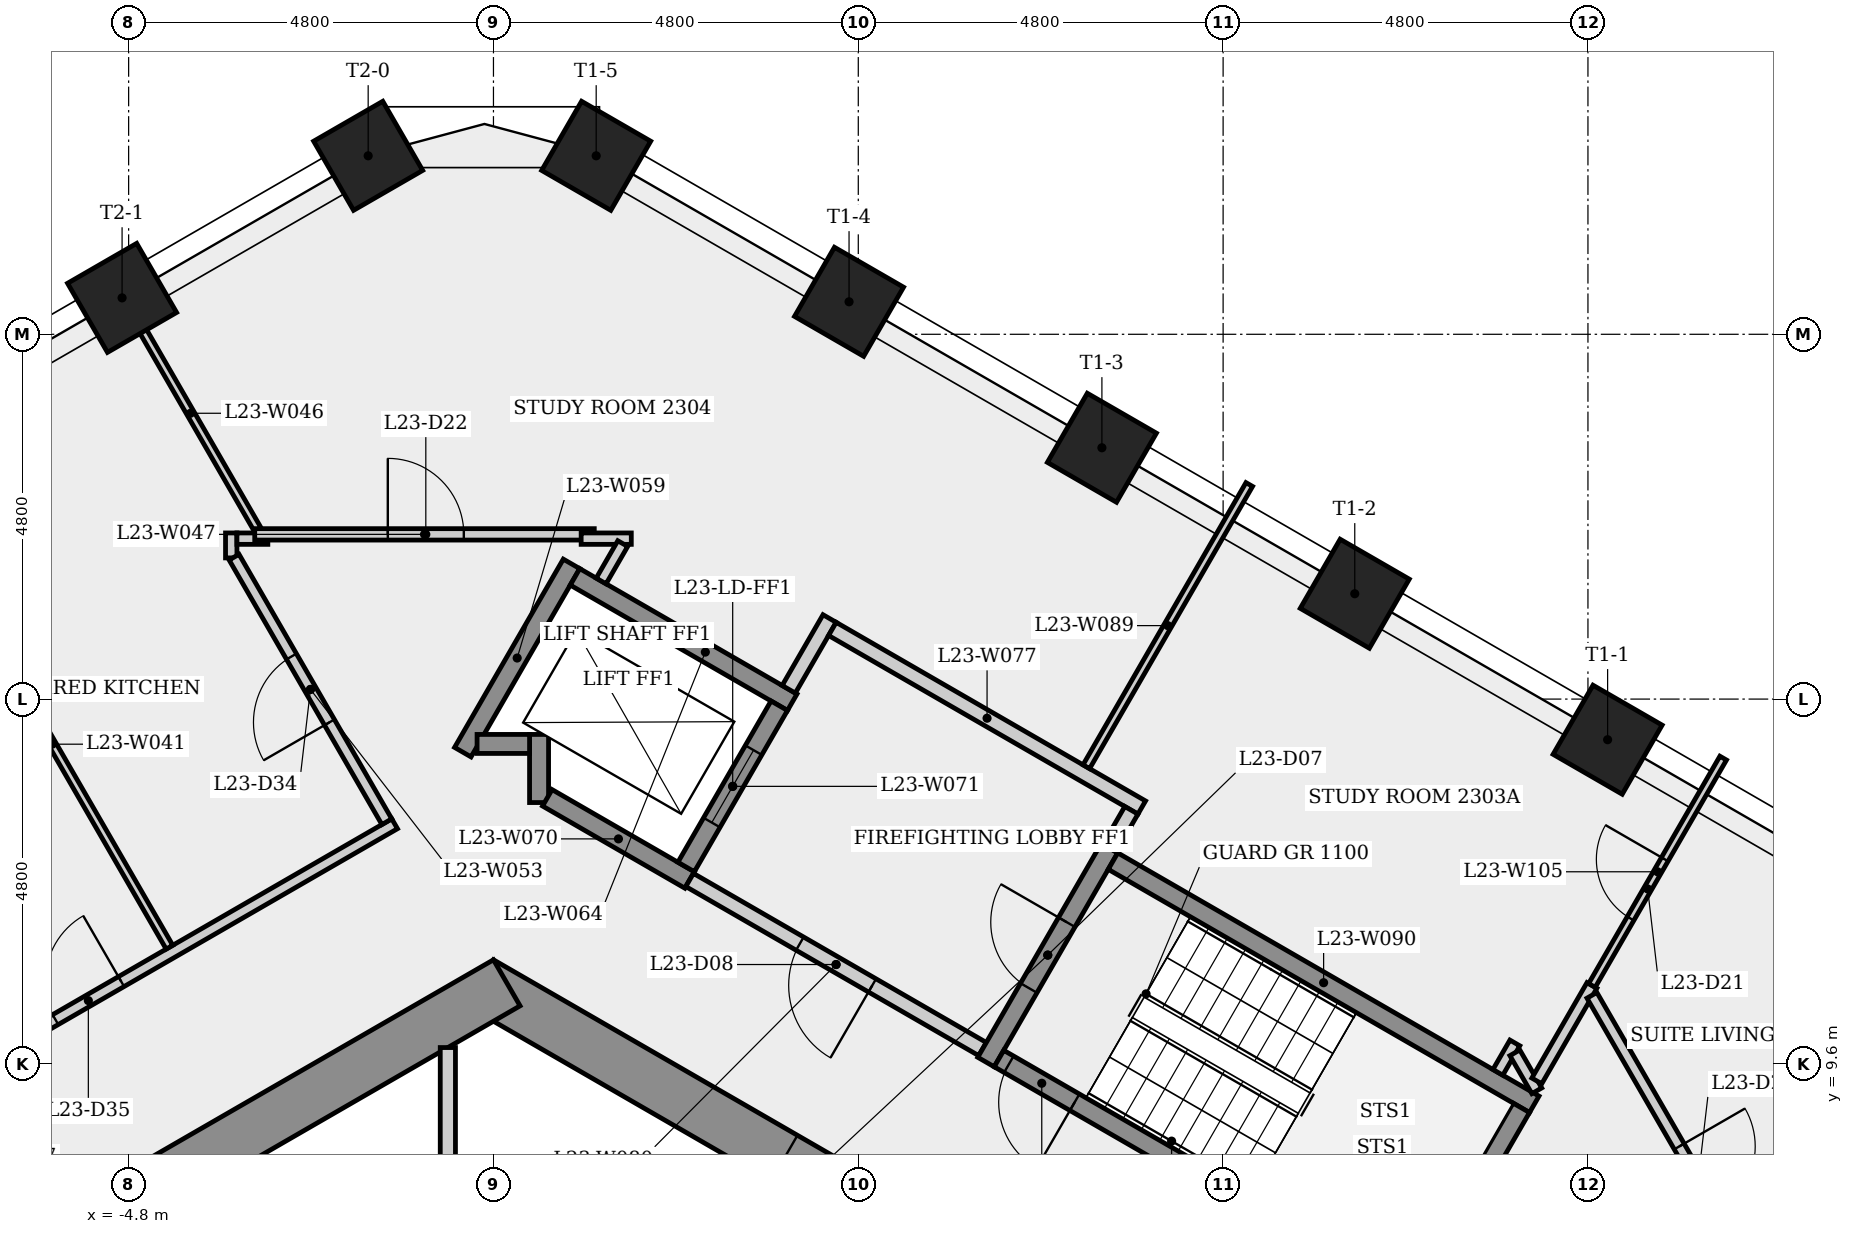
"""IFC4 building model, lengths in metres.
Left out: names, types, materials, properties, quantities, classifications, styles, units other than length and angle.
Written with IfcOpenShell. Run it as: python <this file> out.ifc"""

import sys

from ifc_helpers import new_model, si_unit, direction, frame, frame_2d, origin, origin_2d, place, context, subcontext, project, spatial, rectangle, extrude, element, fill, save


model = new_model("IFC4")
c1 = context("Model", 3, precision=1e-05, world=origin(), true_north=direction((0.0, 1.0)))
c2 = subcontext(c1, "Body", "Model", "MODEL_VIEW")
j1 = project(units=[si_unit("LENGTHUNIT", "METRE"), si_unit("PLANEANGLEUNIT", "RADIAN")], contexts=[c1])
p1 = place(None, origin())
s1 = spatial("IfcSite", under=j1, at=p1, CompositionType="ELEMENT")
p2 = place(p1, origin())
s2 = spatial("IfcBuilding", under=s1, at=p2, CompositionType="ELEMENT")
p3 = place(p2, frame((0.0, 0.0, 89.9)))
s3 = spatial("IfcBuildingStorey", under=s2, at=p3, CompositionType="ELEMENT", Elevation=89.9)
p4 = place(p3, frame((9.325, 5.182, 0.0), z_axis=(0.0, 0.0, 1.0), x_axis=(-0.866023993627, 0.500002442456, 0.0)))
e1 = element("IfcWall", 1, at=p4, inside=s3, PredefinedType="SHEAR", context=c2, shape_type="SweptSolid", body=[
    extrude(rectangle(XDim=10.97, YDim=0.7, at=frame_2d((5.485, 0.0))), origin(), (0.0, 0.0, 1.0), 3.4),
])
p5 = place(p4, frame((5.451, 0.0, 0.0)))
e2 = element("IfcOpeningElement", 2, at=p5, cuts=e1, PredefinedType="OPENING", context=c2, shape_type="SweptSolid", body=[
    extrude(rectangle(XDim=0.9, YDim=2.1, at=frame_2d((0.45, 1.05))), frame((0.0, 0.36, 0.0), z_axis=(0.0, -1.0, 0.0), x_axis=(1.0, 0.0, 0.0)), (0.0, 0.0, 1.0), 0.72),
])
p6 = place(p3, frame((0.175, 10.667, 0.0), z_axis=(0.0, 0.0, 1.0), x_axis=(-0.866023993627, -0.500002442456, 0.0)))
e3 = element("IfcWall", 3, at=p6, inside=s3, PredefinedType="SHEAR", context=c2, shape_type="SweptSolid", body=[
    extrude(rectangle(XDim=10.97, YDim=0.7, at=frame_2d((5.485, 0.0))), origin(), (0.0, 0.0, 1.0), 3.4),
])
p7 = place(p6, frame((7.021, 0.0, 0.0)))
e4 = element("IfcOpeningElement", 4, at=p7, cuts=e3, PredefinedType="OPENING", context=c2, shape_type="SweptSolid", body=[
    extrude(rectangle(XDim=0.9, YDim=2.1, at=frame_2d((0.45, 1.05))), frame((0.0, 0.36, 0.0), z_axis=(0.0, -1.0, 0.0), x_axis=(1.0, 0.0, 0.0)), (0.0, 0.0, 1.0), 0.72),
])
for number, where, z_axis, x_axis in (
    (5, (14.659, 13.865, 0.0), (0.0, 0.0, 1.0), (0.5, 0.866, 0.0)),
    (6, (11.332, 15.786, 0.0), (0.0, 0.0, 1.0), (0.5, 0.866, 0.0)),
    (7, (8.005, 17.707, 0.0), (0.0, 0.0, 1.0), (0.5, 0.866, 0.0)),
    (8, (4.678, 19.628, 0.0), (0.0, 0.0, 1.0), (0.5, 0.866, 0.0)),
    (9, (1.352, 21.548, 0.0), (0.0, 0.0, 1.0), (0.5, 0.866, 0.0)),
    (10, (-1.648, 21.548, 0.0), (0.0, 0.0, 1.0), (-0.5, 0.866, 0.0)),
    (11, (-4.886, 19.679, 0.0), (0.0, 0.0, 1.0), (-0.5, 0.866, 0.0)),
):
    element("IfcColumn", number, at=place(p3, frame(where, z_axis=z_axis, x_axis=x_axis)), inside=s3, PredefinedType="COLUMN", context=c2, shape_type="SweptSolid", body=[
        extrude(rectangle(XDim=1.05, YDim=1.05, at=origin_2d()), origin(), (0.0, 0.0, 1.0), 3.4),
    ])
p8 = place(p3, frame((-10.659, 7.356, 0.0), z_axis=(0.0, 0.0, 1.0), x_axis=(0.866022689903, 0.500004700551, 0.0)))
e12 = element("IfcWall", 12, at=p8, inside=s3, PredefinedType="PARTITIONING", context=c2, shape_type="SweptSolid", body=[
    extrude(rectangle(XDim=10.807, YDim=0.15, at=frame_2d((5.404, 0.0))), origin(), (0.0, 0.0, 1.0), 3.05),
])
p9 = place(p8, frame((5.654, 0.0, 0.0)))
e13 = element("IfcOpeningElement", 13, at=p9, cuts=e12, PredefinedType="OPENING", context=c2, shape_type="SweptSolid", body=[
    extrude(rectangle(XDim=1.0, YDim=2.1, at=frame_2d((0.5, 1.05))), frame((0.0, 0.085, 0.0), z_axis=(0.0, -1.0, 0.0), x_axis=(1.0, 0.0, 0.0)), (0.0, 0.0, 1.0), 0.17),
])
p10 = place(p3, frame((-4.263, 11.135, 0.0), z_axis=(0.0, 0.0, 1.0), x_axis=(-0.499997453958, 0.866026873738, 0.0)))
e14 = element("IfcWall", 14, at=p10, inside=s3, PredefinedType="PARTITIONING", context=c2, shape_type="SweptSolid", body=[
    extrude(rectangle(XDim=7.71, YDim=0.1, at=frame_2d((3.855, 0.0))), origin(), (0.0, 0.0, 1.0), 3.05),
])
p11 = place(p3, frame((-3.45, 16.258, 0.0), z_axis=(0.0, 0.0, 1.0), x_axis=(0.0, 1.0, 0.0)))
e15 = element("IfcWall", 15, at=p11, inside=s3, PredefinedType="PARTITIONING", context=c2, shape_type="SweptSolid", body=[
    extrude(rectangle(XDim=0.328, YDim=0.15, at=frame_2d((0.164, 0.0))), origin(), (0.0, 0.0, 1.0), 3.05),
])
p12 = place(p3, frame((-3.375, 16.511, 0.0), z_axis=(0.0, 0.0, 1.0), x_axis=(1.0, 0.0, 0.0)))
e16 = element("IfcWall", 16, at=p12, inside=s3, PredefinedType="PARTITIONING", context=c2, shape_type="SweptSolid", body=[
    extrude(rectangle(XDim=0.406, YDim=0.15, at=frame_2d((0.203, 0.0))), origin(), (0.0, 0.0, 1.0), 3.05),
])
p13 = place(p3, frame((-3.104, 16.632, 0.0), z_axis=(0.0, 0.0, 1.0), x_axis=(-0.499999858875, 0.866025485263, 0.0)))
e17 = element("IfcWall", 17, at=p13, inside=s3, PredefinedType="PARTITIONING", context=c2, shape_type="SweptSolid", body=[
    extrude(rectangle(XDim=3.53, YDim=0.1, at=frame_2d((1.765, 0.0))), origin(), (0.0, 0.0, 1.0), 3.05),
])
p14 = place(p3, frame((-3.141, 16.567, 0.0), z_axis=(0.0, 0.0, 1.0), x_axis=(1.0, 0.0, 0.0)))
e18 = element("IfcWall", 18, at=p14, inside=s3, PredefinedType="PARTITIONING", context=c2, shape_type="SweptSolid", body=[
    extrude(rectangle(XDim=4.467, YDim=0.15, at=frame_2d((2.234, 0.0))), origin(), (0.0, 0.0, 1.0), 3.05),
])
p15 = place(p14, frame((1.751, 0.0, 0.0)))
e19 = element("IfcOpeningElement", 19, at=p15, cuts=e18, PredefinedType="OPENING", context=c2, shape_type="SweptSolid", body=[
    extrude(rectangle(XDim=1.0, YDim=2.1, at=frame_2d((0.5, 1.05))), frame((0.0, 0.085, 0.0), z_axis=(0.0, -1.0, 0.0), x_axis=(1.0, 0.0, 0.0)), (0.0, 0.0, 1.0), 0.17),
])
p16 = place(p3, frame((-1.403, 12.787, 0.0), z_axis=(0.0, 0.0, 1.0), x_axis=(-0.500006371327, 0.866021725266, 0.0)))
e20 = element("IfcWall", 20, at=p16, inside=s3, PredefinedType="PARTITIONING", context=c2, shape_type="SweptSolid", body=[
    extrude(rectangle(XDim=4.02, YDim=0.15, at=frame_2d((2.01, 0.0))), origin(), (0.0, 0.0, 1.0), 3.05),
])
p17 = place(p16, frame((1.51, 0.0, 0.0)))
e21 = element("IfcOpeningElement", 21, at=p17, cuts=e20, PredefinedType="OPENING", context=c2, shape_type="SweptSolid", body=[
    extrude(rectangle(XDim=1.0, YDim=2.1, at=frame_2d((0.5, 1.05))), frame((0.0, 0.085, 0.0), z_axis=(0.0, -1.0, 0.0), x_axis=(1.0, 0.0, 0.0)), (0.0, 0.0, 1.0), 0.17),
])
p18 = place(p3, frame((-0.6, 9.815, 0.0), z_axis=(0.0, 0.0, 1.0), x_axis=(0.0, -1.0, 0.0)))
e22 = element("IfcWall", 22, at=p18, inside=s3, PredefinedType="PARTITIONING", context=c2, shape_type="SweptSolid", body=[
    extrude(rectangle(XDim=4.54, YDim=0.2, at=frame_2d((2.27, 0.0))), origin(), (0.0, 0.0, 1.0), 3.05),
])
p19 = place(p3, frame((-0.403, 13.702, 0.0), z_axis=(0.0, 0.0, 1.0), x_axis=(0.499976111731, 0.866039195244, 0.0)))
e23 = element("IfcWall", 23, at=p19, inside=s3, PredefinedType="SHEAR", context=c2, shape_type="SweptSolid", body=[
    extrude(rectangle(XDim=2.861, YDim=0.25, at=frame_2d((1.43, 0.0))), origin(), (0.0, 0.0, 1.0), 3.05),
])
p20 = place(p3, frame((0.6, 13.039, 0.0), z_axis=(0.0, 0.0, 1.0), x_axis=(0.0, 1.0, 0.0)))
e24 = element("IfcWall", 24, at=p20, inside=s3, PredefinedType="SHEAR", context=c2, shape_type="SweptSolid", body=[
    extrude(rectangle(XDim=0.896, YDim=0.25, at=frame_2d((0.448, 0.0))), origin(), (0.0, 0.0, 1.0), 3.05),
])
p21 = place(p3, frame((0.475, 13.81, 0.0), z_axis=(0.0, 0.0, 1.0), x_axis=(-1.0, 0.0, 0.0)))
e25 = element("IfcWall", 25, at=p21, inside=s3, PredefinedType="SHEAR", context=c2, shape_type="SweptSolid", body=[
    extrude(rectangle(XDim=0.691, YDim=0.25, at=frame_2d((0.345, 0.0))), origin(), (0.0, 0.0, 1.0), 3.4),
])
p22 = place(p3, frame((1.073, 16.008, 0.0), z_axis=(0.0, 0.0, 1.0), x_axis=(0.866040211805, -0.499974350878, 0.0)))
e26 = element("IfcWall", 26, at=p22, inside=s3, PredefinedType="SHEAR", context=c2, shape_type="SweptSolid", body=[
    extrude(rectangle(XDim=3.3, YDim=0.25, at=frame_2d((1.65, 0.0))), origin(), (0.0, 0.0, 1.0), 3.05),
])
p23 = place(p3, frame((1.154, 16.511, 0.0), z_axis=(0.0, 0.0, 1.0), x_axis=(1.0, 0.0, 0.0)))
e27 = element("IfcWall", 27, at=p23, inside=s3, PredefinedType="PARTITIONING", context=c2, shape_type="SweptSolid", body=[
    extrude(rectangle(XDim=0.66, YDim=0.15, at=frame_2d((0.33, 0.0))), origin(), (0.0, 0.0, 1.0), 3.05),
])
p24 = place(p3, frame((1.701, 16.446, 0.0), z_axis=(0.0, 0.0, 1.0), x_axis=(-0.500206000974, -0.865906436394, 0.0)))
e28 = element("IfcWall", 28, at=p24, inside=s3, PredefinedType="PARTITIONING", context=c2, shape_type="SweptSolid", body=[
    extrude(rectangle(XDim=0.568, YDim=0.15, at=frame_2d((0.284, 0.0))), origin(), (0.0, 0.0, 1.0), 3.05),
])
p25 = place(p3, frame((2.581, 12.02, 0.0), z_axis=(0.0, 0.0, 1.0), x_axis=(-0.86603892542, 0.499976579108, 0.0)))
e29 = element("IfcWall", 29, at=p25, inside=s3, PredefinedType="SHEAR", context=c2, shape_type="SweptSolid", body=[
    extrude(rectangle(XDim=2.162, YDim=0.25, at=frame_2d((1.081, 0.0))), origin(), (0.0, 0.0, 1.0), 3.05),
])
p26 = place(p3, frame((2.535, 12.191, 0.0), z_axis=(0.0, 0.0, 1.0), x_axis=(0.500061746146, 0.865989751695, 0.0)))
e30 = element("IfcWall", 30, at=p26, inside=s3, PredefinedType="SHEAR", context=c2, shape_type="SweptSolid", body=[
    extrude(rectangle(XDim=2.45, YDim=0.25, at=frame_2d((1.225, 0.0))), origin(), (0.0, 0.0, 1.0), 3.4),
])
p27 = place(p26, frame((0.675, 0.0, 0.0)))
e31 = element("IfcOpeningElement", 31, at=p27, cuts=e30, PredefinedType="OPENING", context=c2, shape_type="SweptSolid", body=[
    extrude(rectangle(XDim=1.1, YDim=2.1, at=frame_2d((0.55, 1.05))), frame((0.0, 0.135, 0.0), z_axis=(0.0, -1.0, 0.0), x_axis=(1.0, 0.0, 0.0)), (0.0, 0.0, 1.0), 0.27),
])
p28 = place(p3, frame((3.885, 14.529, 0.0), z_axis=(0.0, 0.0, 1.0), x_axis=(0.499997628298, 0.866026773083, 0.0)))
e32 = element("IfcWall", 32, at=p28, inside=s3, PredefinedType="PARTITIONING", context=c2, shape_type="SweptSolid", body=[
    extrude(rectangle(XDim=1.075, YDim=0.2, at=frame_2d((0.538, 0.0))), origin(), (0.0, 0.0, 1.0), 3.05),
])
p29 = place(p3, frame((4.459, 15.323, 0.0), z_axis=(0.0, 0.0, 1.0), x_axis=(0.866016039709, -0.500016218704, 0.0)))
e33 = element("IfcWall", 33, at=p29, inside=s3, PredefinedType="PARTITIONING", context=c2, shape_type="SweptSolid", body=[
    extrude(rectangle(XDim=4.7, YDim=0.2, at=frame_2d((2.35, 0.0))), origin(), (0.0, 0.0, 1.0), 3.05),
])
p30 = place(p3, frame((6.435, 9.795, 0.0), z_axis=(0.0, 0.0, 1.0), x_axis=(-0.866012907634, 0.500021643343, 0.0)))
e34 = element("IfcWall", 34, at=p30, inside=s3, PredefinedType="PARTITIONING", context=c2, shape_type="SweptSolid", body=[
    extrude(rectangle(XDim=4.45, YDim=0.2, at=frame_2d((2.225, 0.0))), origin(), (0.0, 0.0, 1.0), 3.05),
])
p31 = place(p30, frame((1.675, 0.0, 0.0)))
e35 = element("IfcOpeningElement", 35, at=p31, cuts=e34, PredefinedType="OPENING", context=c2, shape_type="SweptSolid", body=[
    extrude(rectangle(XDim=1.1, YDim=2.1, at=frame_2d((0.55, 1.05))), frame((0.0, 0.11, 0.0), z_axis=(0.0, -1.0, 0.0), x_axis=(1.0, 0.0, 0.0)), (0.0, 0.0, 1.0), 0.22),
])
p32 = place(p3, frame((6.48, 9.624, 0.0), z_axis=(0.0, 0.0, 1.0), x_axis=(0.500017246033, 0.866015446554, 0.0)))
e36 = element("IfcWall", 36, at=p32, inside=s3, PredefinedType="SHEAR", context=c2, shape_type="SweptSolid", body=[
    extrude(rectangle(XDim=3.25, YDim=0.25, at=frame_2d((1.625, 0.0))), origin(), (0.0, 0.0, 1.0), 3.05),
])
p33 = place(p32, frame((1.125, 0.0, 0.0)))
e37 = element("IfcOpeningElement", 37, at=p33, cuts=e36, PredefinedType="OPENING", context=c2, shape_type="SweptSolid", body=[
    extrude(rectangle(XDim=1.0, YDim=2.1, at=frame_2d((0.5, 1.05))), frame((0.0, 0.135, 0.0), z_axis=(0.0, -1.0, 0.0), x_axis=(1.0, 0.0, 0.0)), (0.0, 0.0, 1.0), 0.27),
])
p34 = place(p3, frame((7.8, 13.51, 0.0), z_axis=(0.0, 0.0, 1.0), x_axis=(0.499978750566, 0.866037671803, 0.0)))
e38 = element("IfcWall", 38, at=p34, inside=s3, PredefinedType="PARTITIONING", context=c2, shape_type="SweptSolid", body=[
    extrude(rectangle(XDim=4.288, YDim=0.1, at=frame_2d((2.144, 0.0))), origin(), (0.0, 0.0, 1.0), 3.05),
])
p35 = place(p3, frame((8.151, 12.268, 0.0), z_axis=(0.0, 0.0, 1.0), x_axis=(0.866025499775, -0.499999833739, 0.0)))
e39 = element("IfcWall", 39, at=p35, inside=s3, PredefinedType="SHEAR", context=c2, shape_type="SweptSolid", body=[
    extrude(rectangle(XDim=6.4, YDim=0.25, at=frame_2d((3.2, 0.0))), origin(), (0.0, 0.0, 1.0), 3.05),
])
p36 = place(p3, frame((8.393, 12.937, 0.0), z_axis=(0.0, 0.0, 1.0), x_axis=(-0.500065409566, -0.86598763626, 0.0)))
e40 = element("IfcWall", 40, at=p36, inside=s3, PredefinedType="PARTITIONING", context=c2, shape_type="SweptSolid", body=[
    extrude(rectangle(XDim=0.575, YDim=0.2, at=frame_2d((0.288, 0.0))), origin(), (0.0, 0.0, 1.0), 3.05),
])
p37 = place(p3, frame((12.194, 6.47, 0.0), z_axis=(0.0, 0.0, 1.0), x_axis=(-0.866025499775, 0.499999833739, 0.0)))
e41 = element("IfcWall", 41, at=p37, inside=s3, PredefinedType="SHEAR", context=c2, shape_type="SweptSolid", body=[
    extrude(rectangle(XDim=6.4, YDim=0.25, at=frame_2d((3.2, 0.0))), origin(), (0.0, 0.0, 1.0), 3.05),
])
p38 = place(p37, frame((5.25, 0.0, 0.0)))
e42 = element("IfcOpeningElement", 42, at=p38, cuts=e41, PredefinedType="OPENING", context=c2, shape_type="SweptSolid", body=[
    extrude(rectangle(XDim=1.0, YDim=2.1, at=frame_2d((0.5, 1.05))), frame((0.0, 0.135, 0.0), z_axis=(0.0, -1.0, 0.0), x_axis=(1.0, 0.0, 0.0)), (0.0, 0.0, 1.0), 0.27),
])
p39 = place(p3, frame((13.215, 9.489, 0.0), z_axis=(0.0, 0.0, 1.0), x_axis=(0.500132045864, 0.865949153646, 0.0)))
e43 = element("IfcWall", 43, at=p39, inside=s3, PredefinedType="PARTITIONING", context=c2, shape_type="SweptSolid", body=[
    extrude(rectangle(XDim=0.447, YDim=0.15, at=frame_2d((0.224, 0.0))), origin(), (0.0, 0.0, 1.0), 3.05),
])
p40 = place(p3, frame((13.438, 9.746, 0.0), z_axis=(0.0, 0.0, 1.0), x_axis=(0.499868889286, -0.866101087359, 0.0)))
e44 = element("IfcWall", 44, at=p40, inside=s3, PredefinedType="PARTITIONING", context=c2, shape_type="SweptSolid", body=[
    extrude(rectangle(XDim=0.577, YDim=0.15, at=frame_2d((0.289, 0.0))), origin(), (0.0, 0.0, 1.0), 3.05),
])
p41 = place(p3, frame((13.523, 9.022, 0.0), z_axis=(0.0, 0.0, 1.0), x_axis=(-0.500034990121, -0.866005201286, 0.0)))
e45 = element("IfcWall", 45, at=p41, inside=s3, PredefinedType="SHEAR", context=c2, shape_type="SweptSolid", body=[
    extrude(rectangle(XDim=2.75, YDim=0.25, at=frame_2d((1.375, 0.0))), origin(), (0.0, 0.0, 1.0), 3.05),
])
p42 = place(p3, frame((13.727, 9.376, 0.0), z_axis=(0.0, 0.0, 1.0), x_axis=(0.499994385119, 0.866028645513, 0.0)))
e46 = element("IfcWall", 46, at=p42, inside=s3, PredefinedType="PARTITIONING", context=c2, shape_type="SweptSolid", body=[
    extrude(rectangle(XDim=1.451, YDim=0.15, at=frame_2d((0.725, 0.0))), origin(), (0.0, 0.0, 1.0), 3.05),
])
p43 = place(p3, frame((14.452, 10.632, 0.0), z_axis=(0.0, 0.0, 1.0), x_axis=(0.499993736042, 0.866029020252, 0.0)))
e47 = element("IfcWall", 47, at=p43, inside=s3, PredefinedType="PARTITIONING", context=c2, shape_type="SweptSolid", body=[
    extrude(rectangle(XDim=3.454, YDim=0.1, at=frame_2d((1.727, 0.0))), origin(), (0.0, 0.0, 1.0), 3.05),
])
p44 = place(p43, frame((1.016, 0.0, 0.0)))
e48 = element("IfcOpeningElement", 48, at=p44, cuts=e47, PredefinedType="OPENING", context=c2, shape_type="SweptSolid", body=[
    extrude(rectangle(XDim=0.9, YDim=2.1, at=frame_2d((0.45, 1.05))), frame((0.0, 0.06, 0.0), z_axis=(0.0, -1.0, 0.0), x_axis=(1.0, 0.0, 0.0)), (0.0, 0.0, 1.0), 0.12),
])
p45 = place(p3, frame((14.452, 10.502, 0.0), z_axis=(0.0, 0.0, 1.0), x_axis=(0.500025088952, -0.866010918186, 0.0)))
e49 = element("IfcWall", 49, at=p45, inside=s3, PredefinedType="PARTITIONING", context=c2, shape_type="SweptSolid", body=[
    extrude(rectangle(XDim=5.703, YDim=0.15, at=frame_2d((2.852, 0.0))), origin(), (0.0, 0.0, 1.0), 3.05),
])
p46 = place(p45, frame((2.297, 0.0, 0.0)))
e50 = element("IfcOpeningElement", 50, at=p46, cuts=e49, PredefinedType="OPENING", context=c2, shape_type="SweptSolid", body=[
    extrude(rectangle(XDim=1.0, YDim=2.1, at=frame_2d((0.5, 1.05))), frame((0.0, 0.085, 0.0), z_axis=(0.0, -1.0, 0.0), x_axis=(1.0, 0.0, 0.0)), (0.0, 0.0, 1.0), 0.17),
])
p47 = place(p38, origin())
e51 = element("IfcDoor", 51, at=p47, inside=s3, OperationType="SINGLE_SWING_LEFT", PredefinedType="DOOR", context=c2, shape_type="SweptSolid", body=[
    extrude(rectangle(XDim=1.0, YDim=2.1, at=frame_2d((0.5, 1.05))), frame((0.0, 0.025, 0.0), z_axis=(0.0, -1.0, 0.0), x_axis=(1.0, 0.0, 0.0)), (0.0, 0.0, 1.0), 0.05),
])
fill(e42, e51)
p48 = place(p33, origin())
e52 = element("IfcDoor", 52, at=p48, inside=s3, OperationType="SINGLE_SWING_RIGHT", PredefinedType="DOOR", context=c2, shape_type="SweptSolid", body=[
    extrude(rectangle(XDim=1.0, YDim=2.1, at=frame_2d((0.5, 1.05))), frame((0.0, 0.025, 0.0), z_axis=(0.0, -1.0, 0.0), x_axis=(1.0, 0.0, 0.0)), (0.0, 0.0, 1.0), 0.05),
])
fill(e37, e52)
p49 = place(p31, origin())
e53 = element("IfcDoor", 53, at=p49, inside=s3, OperationType="SINGLE_SWING_LEFT", PredefinedType="DOOR", context=c2, shape_type="SweptSolid", body=[
    extrude(rectangle(XDim=1.1, YDim=2.1, at=frame_2d((0.55, 1.05))), frame((0.0, 0.025, 0.0), z_axis=(0.0, -1.0, 0.0), x_axis=(1.0, 0.0, 0.0)), (0.0, 0.0, 1.0), 0.05),
])
fill(e35, e53)
p50 = place(p27, origin())
e54 = element("IfcDoor", 54, at=p50, inside=s3, OperationType="SLIDING_TO_LEFT", PredefinedType="DOOR", context=c2, shape_type="SweptSolid", body=[
    extrude(rectangle(XDim=1.1, YDim=2.1, at=frame_2d((0.55, 1.05))), frame((0.0, 0.025, 0.0), z_axis=(0.0, -1.0, 0.0), x_axis=(1.0, 0.0, 0.0)), (0.0, 0.0, 1.0), 0.05),
])
fill(e31, e54)
p51 = place(p46, origin())
e55 = element("IfcDoor", 55, at=p51, inside=s3, OperationType="SINGLE_SWING_LEFT", PredefinedType="DOOR", context=c2, shape_type="SweptSolid", body=[
    extrude(rectangle(XDim=1.0, YDim=2.1, at=frame_2d((0.5, 1.05))), frame((0.0, 0.025, 0.0), z_axis=(0.0, -1.0, 0.0), x_axis=(1.0, 0.0, 0.0)), (0.0, 0.0, 1.0), 0.05),
])
fill(e50, e55)
p52 = place(p44, origin())
e56 = element("IfcDoor", 56, at=p52, inside=s3, OperationType="SINGLE_SWING_RIGHT", PredefinedType="DOOR", context=c2, shape_type="SweptSolid", body=[
    extrude(rectangle(XDim=0.9, YDim=2.1, at=frame_2d((0.45, 1.05))), frame((0.0, 0.025, 0.0), z_axis=(0.0, -1.0, 0.0), x_axis=(1.0, 0.0, 0.0)), (0.0, 0.0, 1.0), 0.05),
])
fill(e48, e56)
p53 = place(p15, origin())
e57 = element("IfcDoor", 57, at=p53, inside=s3, OperationType="SINGLE_SWING_LEFT", PredefinedType="DOOR", context=c2, shape_type="SweptSolid", body=[
    extrude(rectangle(XDim=1.0, YDim=2.1, at=frame_2d((0.5, 1.05))), frame((0.0, 0.025, 0.0), z_axis=(0.0, -1.0, 0.0), x_axis=(1.0, 0.0, 0.0)), (0.0, 0.0, 1.0), 0.05),
])
fill(e19, e57)
p54 = place(p17, origin())
e58 = element("IfcDoor", 58, at=p54, inside=s3, OperationType="SINGLE_SWING_LEFT", PredefinedType="DOOR", context=c2, shape_type="SweptSolid", body=[
    extrude(rectangle(XDim=1.0, YDim=2.1, at=frame_2d((0.5, 1.05))), frame((0.0, 0.025, 0.0), z_axis=(0.0, -1.0, 0.0), x_axis=(1.0, 0.0, 0.0)), (0.0, 0.0, 1.0), 0.05),
])
fill(e21, e58)
p55 = place(p9, origin())
e59 = element("IfcDoor", 59, at=p55, inside=s3, OperationType="SINGLE_SWING_RIGHT", PredefinedType="DOOR", context=c2, shape_type="SweptSolid", body=[
    extrude(rectangle(XDim=1.0, YDim=2.1, at=frame_2d((0.5, 1.05))), frame((0.0, 0.025, 0.0), z_axis=(0.0, -1.0, 0.0), x_axis=(1.0, 0.0, 0.0)), (0.0, 0.0, 1.0), 0.05),
])
fill(e13, e59)
save(model, sys.argv[1])
